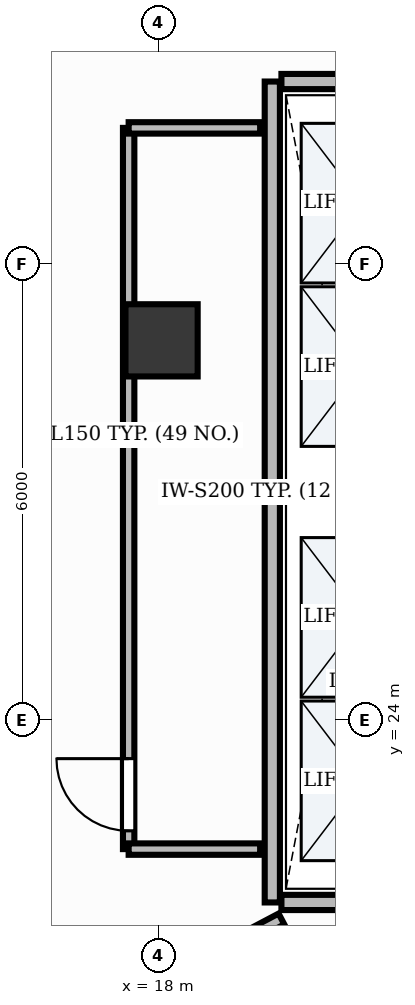
"""IFC4 building model, lengths in metres.
Left out: names, types, materials, properties, quantities, classifications, styles, units other than length and angle.
Written with IfcOpenShell. Run it as: python <this file> out.ifc"""

import sys

from ifc_helpers import new_model, si_unit, direction, frame, frame_2d, origin, origin_2d, place, context, subcontext, project, spatial, rectangle, extrude, element, fill, save


model = new_model("IFC4")
c1 = context("Model", 3, precision=1e-05, world=origin(), true_north=direction((0.0, 1.0)))
c2 = subcontext(c1, "Body", "Model", "MODEL_VIEW")
j1 = project(units=[si_unit("LENGTHUNIT", "METRE"), si_unit("PLANEANGLEUNIT", "RADIAN")], contexts=[c1])
p1 = place(None, origin())
s1 = spatial("IfcSite", under=j1, at=p1, CompositionType="ELEMENT")
p2 = place(p1, origin())
s2 = spatial("IfcBuilding", under=s1, at=p2, CompositionType="ELEMENT")
p3 = place(p2, frame((0.0, 0.0, 204.6)))
s3 = spatial("IfcBuildingStorey", under=s2, at=p3, CompositionType="ELEMENT", Elevation=204.6)
p4 = place(p3, frame((18.043, 28.995, -0.0), z_axis=(0.0, 0.0, 1.0), x_axis=(1.0, 0.0, 0.0)))
e1 = element("IfcColumn", 1, at=p4, inside=s3, PredefinedType="COLUMN", context=c2, shape_type="SweptSolid", body=[
    extrude(rectangle(XDim=0.95, YDim=0.95, at=origin_2d()), origin(), (0.0, 0.0, 1.0), 3.901),
])
p5 = place(p3, frame((19.5, 21.6, 0.0), z_axis=(0.0, 0.0, 1.0), x_axis=(0.0, 1.0, 0.0)))
e2 = element("IfcWall", 2, at=p5, inside=s3, PredefinedType="PARTITIONING", context=c2, shape_type="SweptSolid", body=[
    extrude(rectangle(XDim=10.8, YDim=0.2, at=frame_2d((5.4, 0.0))), origin(), (0.0, 0.0, 1.0), 2.91),
])
for number, where, z_axis, x_axis in (
    (3, (19.62, 21.6, 0.0), (0.0, 0.0, 1.0), (1.0, 0.0, 0.0)),
    (4, (19.62, 32.4, 0.0), (0.0, 0.0, 1.0), (1.0, 0.0, 0.0)),
):
    element("IfcWall", number, at=place(p3, frame(where, z_axis=z_axis, x_axis=x_axis)), inside=s3, PredefinedType="PARTITIONING", context=c2, shape_type="SweptSolid", body=[
        extrude(rectangle(XDim=2.11, YDim=0.2, at=frame_2d((1.055, 0.0))), origin(), (0.0, 0.0, 1.0), 2.91),
    ])
p6 = place(p3, frame((17.61, 22.302, 0.0), z_axis=(0.0, 0.0, 1.0), x_axis=(0.0, 1.0, 0.0)))
e5 = element("IfcWall", 5, at=p6, inside=s3, PredefinedType="PARTITIONING", context=c2, shape_type="SweptSolid", body=[
    extrude(rectangle(XDim=9.488, YDim=0.15, at=frame_2d((4.744, 0.0))), origin(), (0.0, 0.0, 1.0), 2.91),
])
p7 = place(p6, frame((0.24, 0.0, 0.0)))
e6 = element("IfcOpeningElement", 6, at=p7, cuts=e5, PredefinedType="OPENING", context=c2, shape_type="SweptSolid", body=[
    extrude(rectangle(XDim=0.95, YDim=2.15, at=frame_2d((0.475, 1.075))), frame((0.0, 0.09, 0.0), z_axis=(0.0, -1.0, 0.0), x_axis=(1.0, 0.0, 0.0)), (0.0, 0.0, 1.0), 0.18),
])
p8 = place(p3, frame((17.61, 20.322, 0.0), z_axis=(0.0, 0.0, 1.0), x_axis=(0.884437714556, 0.466658257261, 0.0)))
e7 = element("IfcWall", 7, at=p8, inside=s3, PredefinedType="PARTITIONING", context=c2, shape_type="SweptSolid", body=[
    extrude(rectangle(XDim=2.273, YDim=0.16, at=frame_2d((1.136, 0.0))), origin(), (0.0, 0.0, 1.0), 2.91),
])
p9 = place(p3, frame((19.34, 22.302, 0.0), z_axis=(0.0, 0.0, 1.0), x_axis=(-1.0, 0.0, 0.0)))
e8 = element("IfcWall", 8, at=p9, inside=s3, PredefinedType="PARTITIONING", context=c2, shape_type="SweptSolid", body=[
    extrude(rectangle(XDim=1.73, YDim=0.15, at=frame_2d((0.865, 0.0))), origin(), (0.0, 0.0, 1.0), 2.91),
])
p10 = place(p3, frame((17.61, 31.79, 0.0), z_axis=(0.0, 0.0, 1.0), x_axis=(1.0, 0.0, 0.0)))
e9 = element("IfcWall", 9, at=p10, inside=s3, PredefinedType="PARTITIONING", context=c2, shape_type="SweptSolid", body=[
    extrude(rectangle(XDim=1.73, YDim=0.15, at=frame_2d((0.865, 0.0))), origin(), (0.0, 0.0, 1.0), 2.91),
])
p11 = place(p7, origin())
e10 = element("IfcDoor", 10, at=p11, inside=s3, OperationType="SINGLE_SWING_RIGHT", PredefinedType="DOOR", context=c2, shape_type="SweptSolid", body=[
    extrude(rectangle(XDim=0.95, YDim=2.15, at=frame_2d((0.475, 1.075))), frame((0.0, 0.025, 0.0), z_axis=(0.0, -1.0, 0.0), x_axis=(1.0, 0.0, 0.0)), (0.0, 0.0, 1.0), 0.05),
])
fill(e6, e10)
save(model, sys.argv[1])
